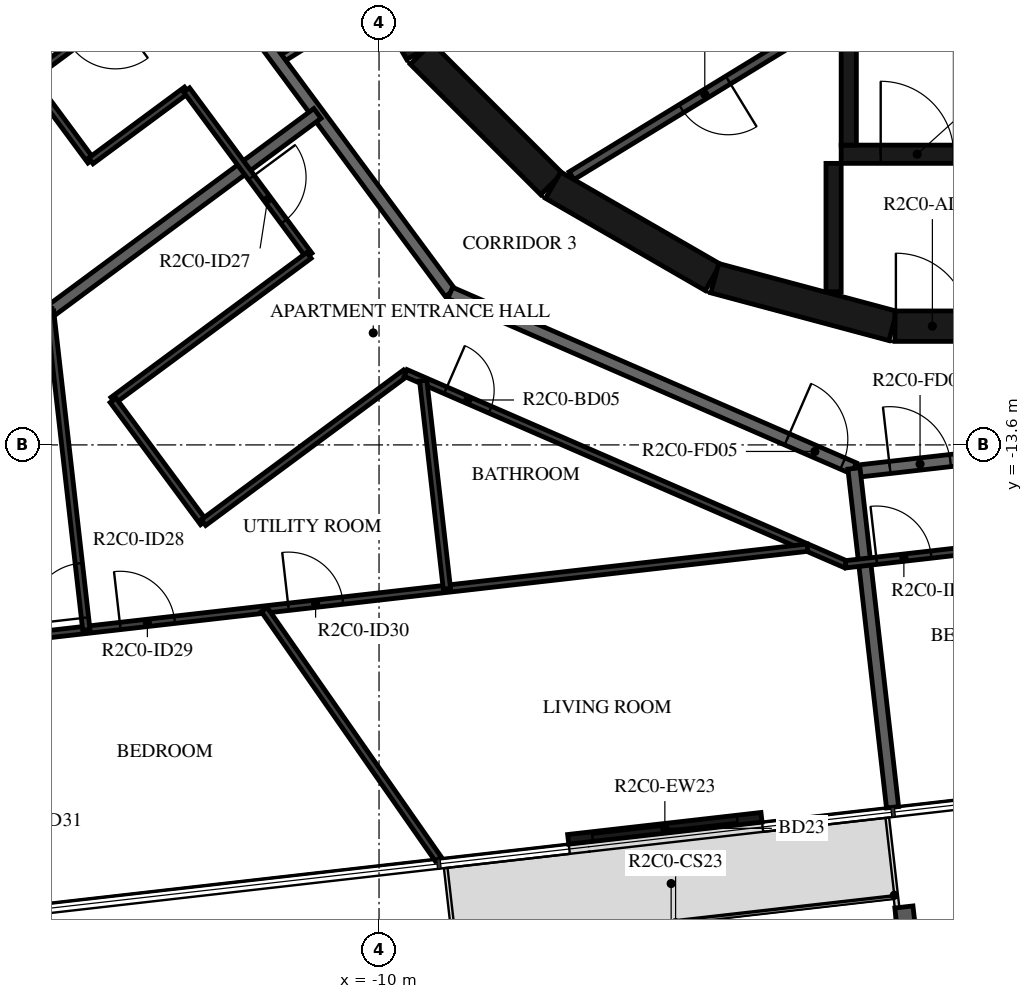
"""IFC4 building model, lengths in metres.
Left out: names, types, materials, properties, quantities, classifications, styles, units other than length and angle.
Written with IfcOpenShell. Run it as: python <this file> out.ifc"""

import sys

from ifc_helpers import new_model, si_unit, direction, frame, frame_2d, origin, origin_2d, place, context, subcontext, project, spatial, rectangle, i_section, extrude, element, fill, save


model = new_model("IFC4")
c1 = context("Model", 3, precision=1e-05, world=origin(), true_north=direction((0.0, 1.0)))
c2 = subcontext(c1, "Body", "Model", "MODEL_VIEW")
j1 = project(units=[si_unit("LENGTHUNIT", "METRE"), si_unit("PLANEANGLEUNIT", "RADIAN")], contexts=[c1])
p1 = place(None, origin())
s1 = spatial("IfcSite", under=j1, at=p1, CompositionType="ELEMENT")
p2 = place(p1, origin())
s2 = spatial("IfcBuilding", under=s1, at=p2, CompositionType="ELEMENT")
p3 = place(p2, frame((0.0, 0.0, 104.7)))
s3 = spatial("IfcBuildingStorey", under=s2, at=p3, CompositionType="ELEMENT", Elevation=104.7)
p4 = place(p3, frame((-1.317, -21.646, -0.38), z_axis=(0.0, 0.0, 1.0), x_axis=(-0.993571881569, -0.113202986513, 0.0)))
e1 = element("IfcColumn", 1, at=p4, inside=s3, PredefinedType="COLUMN", context=c2, shape_type="SweptSolid", body=[
    extrude(i_section(OverallWidth=0.3, OverallDepth=0.9, WebThickness=0.019, FlangeThickness=0.035, FilletRadius=0.03, at=origin_2d()), origin(), (0.0, 0.0, 1.0), 2.616),
])
p5 = place(p3, frame((-6.889, -20.086, 0.0), z_axis=(0.0, 0.0, 1.0), x_axis=(0.993578576686, 0.113144208648, 0.0)))
e2 = element("IfcWall", 2, at=p5, inside=s3, PredefinedType="STANDARD", context=c2, shape_type="SweptSolid", body=[
    extrude(rectangle(XDim=3.2, YDim=0.16, at=frame_2d((1.6, 0.0))), origin(), (0.0, 0.0, 1.0), 3.05),
])
p6 = place(p5, frame((0.4, 0.0, 0.0)))
e3 = element("IfcOpeningElement", 3, at=p6, cuts=e2, PredefinedType="OPENING", context=c2, shape_type="SweptSolid", body=[
    extrude(rectangle(XDim=2.4, YDim=2.4, at=frame_2d((1.2, 1.2))), frame((0.0, 0.09, 0.0), z_axis=(0.0, -1.0, 0.0), x_axis=(1.0, 0.0, 0.0)), (0.0, 0.0, 1.0), 0.18),
])
p7 = place(p3, frame((-10.845, -4.51, 0.0), z_axis=(0.0, 0.0, 1.0), x_axis=(0.500087131594, -0.865975092491, 0.0)))
e4 = element("IfcWall", 4, at=p7, inside=s3, PredefinedType="SHEAR", context=c2, shape_type="SweptSolid", body=[
    extrude(rectangle(XDim=3.033, YDim=0.5, at=frame_2d((1.516, 0.0))), origin(), (0.0, 0.0, 1.0), 3.05),
])
p8 = place(p3, frame((-9.308, -7.164, 0.0), z_axis=(0.0, 0.0, 1.0), x_axis=(0.707106781187, -0.707106781187, 0.0)))
e5 = element("IfcWall", 5, at=p8, inside=s3, PredefinedType="SHEAR", context=c2, shape_type="SweptSolid", body=[
    extrude(rectangle(XDim=3.032, YDim=0.5, at=frame_2d((1.516, 0.0))), origin(), (0.0, 0.0, 1.0), 3.05),
])
for number, where, z_axis, x_axis in (
    (6, (-7.137, -9.329, 0.0), (0.0, 0.0, 1.0), (0.866, -0.5, 0.0)),
    (7, (-4.479, -10.858, 0.0), (0.0, 0.0, 1.0), (0.966, -0.259, 0.0)),
):
    element("IfcWall", number, at=place(p3, frame(where, z_axis=z_axis, x_axis=x_axis)), inside=s3, PredefinedType="SHEAR", context=c2, shape_type="SweptSolid", body=[
        extrude(rectangle(XDim=3.033, YDim=0.5, at=frame_2d((1.516, 0.0))), origin(), (0.0, 0.0, 1.0), 3.05),
    ])
p9 = place(p3, frame((-1.516, -11.647, 0.0), z_axis=(0.0, 0.0, 1.0), x_axis=(1.0, 0.0, 0.0)))
e8 = element("IfcWall", 8, at=p9, inside=s3, PredefinedType="SHEAR", context=c2, shape_type="SweptSolid", body=[
    extrude(rectangle(XDim=3.033, YDim=0.5, at=frame_2d((1.516, 0.0))), origin(), (0.0, 0.0, 1.0), 3.05),
])
p10 = place(p9, frame((0.016, 0.0, 0.0)))
e9 = element("IfcOpeningElement", 9, at=p10, cuts=e8, PredefinedType="OPENING", context=c2, shape_type="SweptSolid", body=[
    extrude(rectangle(XDim=1.2, YDim=2.1, at=frame_2d((0.6, 1.05))), frame((0.0, 0.26, 0.0), z_axis=(0.0, -1.0, 0.0), x_axis=(1.0, 0.0, 0.0)), (0.0, 0.0, 1.0), 0.52),
])
p11 = place(p3, frame((-2.275, -8.67, 0.0), z_axis=(0.0, 0.0, 1.0), x_axis=(0.0, 1.0, 0.0)))
e10 = element("IfcWall", 10, at=p11, inside=s3, PredefinedType="SHEAR", context=c2, shape_type="SweptSolid", body=[
    extrude(rectangle(XDim=3.32, YDim=0.25, at=frame_2d((1.66, 0.0))), origin(), (0.0, 0.0, 1.0), 3.05),
])
p12 = place(p3, frame((-2.4, -8.82, 0.0), z_axis=(0.0, 0.0, 1.0), x_axis=(1.0, 0.0, 0.0)))
e11 = element("IfcWall", 11, at=p12, inside=s3, PredefinedType="SHEAR", context=c2, shape_type="SweptSolid", body=[
    extrude(rectangle(XDim=2.5, YDim=0.3, at=frame_2d((1.25, 0.0))), origin(), (0.0, 0.0, 1.0), 3.05),
])
p13 = place(p12, frame((0.65, 0.0, 0.0)))
e12 = element("IfcOpeningElement", 12, at=p13, cuts=e11, PredefinedType="OPENING", context=c2, shape_type="SweptSolid", body=[
    extrude(rectangle(XDim=1.2, YDim=2.1, at=frame_2d((0.6, 1.05))), frame((0.0, 0.16, 0.0), z_axis=(0.0, -1.0, 0.0), x_axis=(1.0, 0.0, 0.0)), (0.0, 0.0, 1.0), 0.32),
])
p14 = place(p3, frame((-2.525, -8.97, 0.0), z_axis=(0.0, 0.0, 1.0), x_axis=(0.0, -1.0, 0.0)))
e13 = element("IfcWall", 13, at=p14, inside=s3, PredefinedType="SHEAR", context=c2, shape_type="SweptSolid", body=[
    extrude(rectangle(XDim=2.11, YDim=0.25, at=frame_2d((1.055, 0.0))), origin(), (0.0, 0.0, 1.0), 3.05),
])
p15 = place(p3, frame((-2.451, -6.495, 0.0), z_axis=(0.0, 0.0, 1.0), x_axis=(-0.853250115418, -0.521501908471, 0.0)))
e14 = element("IfcWall", 14, at=p15, inside=s3, PredefinedType="PARTITIONING", context=c2, shape_type="SweptSolid", body=[
    extrude(rectangle(XDim=5.137, YDim=0.15, at=frame_2d((2.569, 0.0))), origin(), (0.0, 0.0, 1.0), 3.05),
])
p16 = place(p15, frame((2.119, 0.0, 0.0)))
e15 = element("IfcOpeningElement", 15, at=p16, cuts=e14, PredefinedType="OPENING", context=c2, shape_type="SweptSolid", body=[
    extrude(rectangle(XDim=0.9, YDim=2.1, at=frame_2d((0.45, 1.05))), frame((0.0, 0.085, 0.0), z_axis=(0.0, -1.0, 0.0), x_axis=(1.0, 0.0, 0.0)), (0.0, 0.0, 1.0), 0.17),
])
p17 = place(p3, frame((-11.654, -7.282, 0.0), z_axis=(0.0, 0.0, 1.0), x_axis=(0.848117698675, 0.529807860638, 0.0)))
e16 = element("IfcWall", 16, at=p17, inside=s3, PredefinedType="PARTITIONING", context=c2, shape_type="SweptSolid", body=[
    extrude(rectangle(XDim=1.838, YDim=0.12, at=frame_2d((0.919, 0.0))), origin(), (0.0, 0.0, 1.0), 3.05),
])
p18 = place(p17, frame((0.115, 0.0, 0.0)))
e17 = element("IfcOpeningElement", 17, at=p18, cuts=e16, PredefinedType="OPENING", context=c2, shape_type="SweptSolid", body=[
    extrude(rectangle(XDim=1.2, YDim=2.1, at=frame_2d((0.6, 1.05))), frame((0.0, 0.07, 0.0), z_axis=(0.0, -1.0, 0.0), x_axis=(1.0, 0.0, 0.0)), (0.0, 0.0, 1.0), 0.14),
])
p19 = place(p3, frame((-13.196, -5.198, 0.0), z_axis=(0.0, 0.0, 1.0), x_axis=(0.594805187394, -0.803869883159, 0.0)))
e18 = element("IfcWall", 18, at=p19, inside=s3, PredefinedType="STANDARD", context=c2, shape_type="SweptSolid", body=[
    extrude(rectangle(XDim=7.342, YDim=0.2, at=frame_2d((3.671, 0.0))), origin(), (0.0, 0.0, 1.0), 3.05),
])
p20 = place(p3, frame((-8.829, -11.1, 0.0), z_axis=(0.0, 0.0, 1.0), x_axis=(0.917063622491, -0.398740908742, 0.0)))
e19 = element("IfcWall", 19, at=p20, inside=s3, PredefinedType="STANDARD", context=c2, shape_type="SweptSolid", body=[
    extrude(rectangle(XDim=7.24, YDim=0.2, at=frame_2d((3.62, 0.0))), origin(), (0.0, 0.0, 1.0), 3.05),
])
p21 = place(p20, frame((6.04, 0.0, 0.0)))
e20 = element("IfcOpeningElement", 20, at=p21, cuts=e19, PredefinedType="OPENING", context=c2, shape_type="SweptSolid", body=[
    extrude(rectangle(XDim=1.0, YDim=2.1, at=frame_2d((0.5, 1.05))), frame((0.0, 0.11, 0.0), z_axis=(0.0, -1.0, 0.0), x_axis=(1.0, 0.0, 0.0)), (0.0, 0.0, 1.0), 0.22),
])
p22 = place(p3, frame((-2.096, -14.028, 0.0), z_axis=(0.0, 0.0, 1.0), x_axis=(0.993569170114, 0.113226782163, 0.0)))
e21 = element("IfcWall", 21, at=p22, inside=s3, PredefinedType="STANDARD", context=c2, shape_type="SweptSolid", body=[
    extrude(rectangle(XDim=7.342, YDim=0.2, at=frame_2d((3.671, 0.0))), origin(), (0.0, 0.0, 1.0), 3.05),
])
p23 = place(p22, frame((0.5, 0.0, 0.0)))
e22 = element("IfcOpeningElement", 22, at=p23, cuts=e21, PredefinedType="OPENING", context=c2, shape_type="SweptSolid", body=[
    extrude(rectangle(XDim=1.0, YDim=2.1, at=frame_2d((0.5, 1.05))), frame((0.0, 0.11, 0.0), z_axis=(0.0, -1.0, 0.0), x_axis=(1.0, 0.0, 0.0)), (0.0, 0.0, 1.0), 0.22),
])
p24 = place(p3, frame((-16.649, -12.32, 0.0), z_axis=(0.0, 0.0, 1.0), x_axis=(0.803869204071, 0.594806105169, 0.0)))
e23 = element("IfcWall", 23, at=p24, inside=s3, PredefinedType="STANDARD", context=c2, shape_type="SweptSolid", body=[
    extrude(rectangle(XDim=7.011, YDim=0.2, at=frame_2d((3.506, 0.0))), origin(), (0.0, 0.0, 1.0), 3.05),
])
p25 = place(p3, frame((-1.555, -19.559, 0.0), z_axis=(0.0, 0.0, 1.0), x_axis=(-0.113221250863, 0.993569800443, 0.0)))
e24 = element("IfcWall", 24, at=p25, inside=s3, PredefinedType="STANDARD", context=c2, shape_type="SweptSolid", body=[
    extrude(rectangle(XDim=5.609, YDim=0.2, at=frame_2d((2.804, 0.0))), origin(), (0.0, 0.0, 1.0), 3.05),
])
p26 = place(p3, frame((-14.175, -6.397, 0.0), z_axis=(0.0, 0.0, 1.0), x_axis=(-0.803901491033, -0.594762467474, 0.0)))
e25 = element("IfcWall", 25, at=p26, inside=s3, PredefinedType="PARTITIONING", context=c2, shape_type="SweptSolid", body=[
    extrude(rectangle(XDim=1.959, YDim=0.12, at=frame_2d((0.979, 0.0))), origin(), (0.0, 0.0, 1.0), 3.05),
])
p27 = place(p26, frame((0.2, 0.0, 0.0)))
e26 = element("IfcOpeningElement", 26, at=p27, cuts=e25, PredefinedType="OPENING", context=c2, shape_type="SweptSolid", body=[
    extrude(rectangle(XDim=0.9, YDim=2.1, at=frame_2d((0.45, 1.05))), frame((0.0, 0.07, 0.0), z_axis=(0.0, -1.0, 0.0), x_axis=(1.0, 0.0, 0.0)), (0.0, 0.0, 1.0), 0.14),
])
p28 = place(p3, frame((-15.75, -7.562, 0.0), z_axis=(0.0, 0.0, 1.0), x_axis=(0.594863421241, -0.803826791087, 0.0)))
e27 = element("IfcWall", 27, at=p28, inside=s3, PredefinedType="PARTITIONING", context=c2, shape_type="SweptSolid", body=[
    extrude(rectangle(XDim=1.7, YDim=0.12, at=frame_2d((0.85, 0.0))), origin(), (0.0, 0.0, 1.0), 3.05),
])
p29 = place(p3, frame((-14.739, -8.929, 0.0), z_axis=(0.0, 0.0, 1.0), x_axis=(0.803901491033, 0.594762467474, 0.0)))
e28 = element("IfcWall", 28, at=p29, inside=s3, PredefinedType="PARTITIONING", context=c2, shape_type="SweptSolid", body=[
    extrude(rectangle(XDim=1.959, YDim=0.12, at=frame_2d((0.979, 0.0))), origin(), (0.0, 0.0, 1.0), 3.05),
])
p30 = place(p3, frame((-13.164, -7.764, 0.0), z_axis=(0.0, 0.0, 1.0), x_axis=(0.594837409261, -0.803846040324, 0.0)))
e29 = element("IfcWall", 29, at=p30, inside=s3, PredefinedType="PARTITIONING", context=c2, shape_type="SweptSolid", body=[
    extrude(rectangle(XDim=3.383, YDim=0.12, at=frame_2d((1.691, 0.0))), origin(), (0.0, 0.0, 1.0), 3.05),
])
p31 = place(p30, frame((1.789, 0.0, 0.0)))
e30 = element("IfcOpeningElement", 30, at=p31, cuts=e29, PredefinedType="OPENING", context=c2, shape_type="SweptSolid", body=[
    extrude(rectangle(XDim=0.9, YDim=2.1, at=frame_2d((0.45, 1.05))), frame((0.0, 0.07, 0.0), z_axis=(0.0, -1.0, 0.0), x_axis=(1.0, 0.0, 0.0)), (0.0, 0.0, 1.0), 0.14),
])
p32 = place(p3, frame((-11.152, -10.483, 0.0), z_axis=(0.0, 0.0, 1.0), x_axis=(-0.803843064298, -0.594841430954, 0.0)))
e31 = element("IfcWall", 31, at=p32, inside=s3, PredefinedType="PARTITIONING", context=c2, shape_type="SweptSolid", body=[
    extrude(rectangle(XDim=4.008, YDim=0.12, at=frame_2d((2.004, 0.0))), origin(), (0.0, 0.0, 1.0), 3.05),
])
p33 = place(p3, frame((-14.374, -12.867, 0.0), z_axis=(0.0, 0.0, 1.0), x_axis=(0.594800097121, -0.803873649565, 0.0)))
e32 = element("IfcWall", 32, at=p33, inside=s3, PredefinedType="PARTITIONING", context=c2, shape_type="SweptSolid", body=[
    extrude(rectangle(XDim=2.5, YDim=0.12, at=frame_2d((1.25, 0.0))), origin(), (0.0, 0.0, 1.0), 3.05),
])
p34 = place(p3, frame((-12.886, -14.877, 0.0), z_axis=(0.0, 0.0, 1.0), x_axis=(0.803816491389, 0.594877338761, 0.0)))
e33 = element("IfcWall", 33, at=p34, inside=s3, PredefinedType="PARTITIONING", context=c2, shape_type="SweptSolid", body=[
    extrude(rectangle(XDim=4.135, YDim=0.12, at=frame_2d((2.068, 0.0))), origin(), (0.0, 0.0, 1.0), 3.05),
])
p35 = place(p3, frame((-9.562, -12.417, 0.0), z_axis=(0.0, 0.0, 1.0), x_axis=(0.917063169851, -0.398741949767, 0.0)))
e34 = element("IfcWall", 34, at=p35, inside=s3, PredefinedType="PARTITIONING", context=c2, shape_type="SweptSolid", body=[
    extrude(rectangle(XDim=7.891, YDim=0.12, at=frame_2d((3.946, 0.0))), origin(), (0.0, 0.0, 1.0), 3.05),
])
p36 = place(p35, frame((0.715, 0.0, 0.0)))
e35 = element("IfcOpeningElement", 35, at=p36, cuts=e34, PredefinedType="OPENING", context=c2, shape_type="SweptSolid", body=[
    extrude(rectangle(XDim=0.8, YDim=2.1, at=frame_2d((0.4, 1.05))), frame((0.0, 0.07, 0.0), z_axis=(0.0, -1.0, 0.0), x_axis=(1.0, 0.0, 0.0)), (0.0, 0.0, 1.0), 0.14),
])
p37 = place(p3, frame((-2.326, -15.563, 0.0), z_axis=(0.0, 0.0, 1.0), x_axis=(0.993575068384, 0.113175012641, 0.0)))
e36 = element("IfcWall", 36, at=p37, inside=s3, PredefinedType="PARTITIONING", context=c2, shape_type="SweptSolid", body=[
    extrude(rectangle(XDim=3.799, YDim=0.12, at=frame_2d((1.899, 0.0))), origin(), (0.0, 0.0, 1.0), 3.05),
])
p38 = place(p37, frame((0.513, 0.0, 0.0)))
e37 = element("IfcOpeningElement", 37, at=p38, cuts=e36, PredefinedType="OPENING", context=c2, shape_type="SweptSolid", body=[
    extrude(rectangle(XDim=0.9, YDim=2.1, at=frame_2d((0.45, 1.05))), frame((0.0, 0.07, 0.0), z_axis=(0.0, -1.0, 0.0), x_axis=(1.0, 0.0, 0.0)), (0.0, 0.0, 1.0), 0.14),
])
p39 = place(p3, frame((-17.437, -16.94, 0.0), z_axis=(0.0, 0.0, 1.0), x_axis=(0.993573314119, 0.113190412448, 0.0)))
e38 = element("IfcWall", 38, at=p39, inside=s3, PredefinedType="PARTITIONING", context=c2, shape_type="SweptSolid", body=[
    extrude(rectangle(XDim=14.576, YDim=0.12, at=frame_2d((7.288, 0.0))), origin(), (0.0, 0.0, 1.0), 3.05),
])
p40 = place(p39, frame((3.201, 0.0, 0.0)))
e39 = element("IfcOpeningElement", 39, at=p40, cuts=e38, PredefinedType="OPENING", context=c2, shape_type="SweptSolid", body=[
    extrude(rectangle(XDim=0.9, YDim=2.1, at=frame_2d((0.45, 1.05))), frame((0.0, 0.07, 0.0), z_axis=(0.0, -1.0, 0.0), x_axis=(1.0, 0.0, 0.0)), (0.0, 0.0, 1.0), 0.14),
])
p41 = place(p39, frame((5.985, 0.0, 0.0)))
e40 = element("IfcOpeningElement", 40, at=p41, cuts=e38, PredefinedType="OPENING", context=c2, shape_type="SweptSolid", body=[
    extrude(rectangle(XDim=0.9, YDim=2.1, at=frame_2d((0.45, 1.05))), frame((0.0, 0.07, 0.0), z_axis=(0.0, -1.0, 0.0), x_axis=(1.0, 0.0, 0.0)), (0.0, 0.0, 1.0), 0.14),
])
p42 = place(p3, frame((-14.813, -16.641, 0.0), z_axis=(0.0, 0.0, 1.0), x_axis=(-0.113210971478, 0.993570971767, 0.0)))
e41 = element("IfcWall", 41, at=p42, inside=s3, PredefinedType="PARTITIONING", context=c2, shape_type="SweptSolid", body=[
    extrude(rectangle(XDim=5.273, YDim=0.12, at=frame_2d((2.636, 0.0))), origin(), (0.0, 0.0, 1.0), 3.05),
])
p43 = place(p42, frame((0.2, 0.0, 0.0)))
e42 = element("IfcOpeningElement", 42, at=p43, cuts=e41, PredefinedType="OPENING", context=c2, shape_type="SweptSolid", body=[
    extrude(rectangle(XDim=0.9, YDim=2.1, at=frame_2d((0.45, 1.05))), frame((0.0, 0.07, 0.0), z_axis=(0.0, -1.0, 0.0), x_axis=(1.0, 0.0, 0.0)), (0.0, 0.0, 1.0), 0.14),
])
p44 = place(p3, frame((-8.884, -15.966, 0.0), z_axis=(0.0, 0.0, 1.0), x_axis=(-0.113230836929, 0.993568708026, 0.0)))
e43 = element("IfcWall", 43, at=p44, inside=s3, PredefinedType="PARTITIONING", context=c2, shape_type="SweptSolid", body=[
    extrude(rectangle(XDim=3.446, YDim=0.12, at=frame_2d((1.723, 0.0))), origin(), (0.0, 0.0, 1.0), 3.05),
])
p45 = place(p3, frame((-9.026, -20.41, 0.0), z_axis=(0.0, 0.0, 1.0), x_axis=(-0.57218083256, 0.82012748695, 0.0)))
e44 = element("IfcWall", 44, at=p45, inside=s3, PredefinedType="PARTITIONING", context=c2, shape_type="SweptSolid", body=[
    extrude(rectangle(XDim=5.002, YDim=0.12, at=frame_2d((2.501, 0.0))), origin(), (0.0, 0.0, 1.0), 3.05),
])
p46 = place(p6, origin())
e45 = element("IfcDoor", 45, at=p46, inside=s3, OperationType="DOUBLE_DOOR_SLIDING", PredefinedType="DOOR", context=c2, shape_type="SweptSolid", body=[
    extrude(rectangle(XDim=2.4, YDim=2.4, at=frame_2d((1.2, 1.2))), frame((0.0, 0.025, 0.0), z_axis=(0.0, -1.0, 0.0), x_axis=(1.0, 0.0, 0.0)), (0.0, 0.0, 1.0), 0.05),
])
fill(e3, e45)
p47 = place(p13, origin())
e46 = element("IfcDoor", 46, at=p47, inside=s3, OperationType="SINGLE_SWING_LEFT", PredefinedType="DOOR", context=c2, shape_type="SweptSolid", body=[
    extrude(rectangle(XDim=1.2, YDim=2.1, at=frame_2d((0.6, 1.05))), frame((0.0, 0.025, 0.0), z_axis=(0.0, -1.0, 0.0), x_axis=(1.0, 0.0, 0.0)), (0.0, 0.0, 1.0), 0.05),
])
fill(e12, e46)
p48 = place(p10, origin())
e47 = element("IfcDoor", 47, at=p48, inside=s3, OperationType="SINGLE_SWING_RIGHT", PredefinedType="DOOR", context=c2, shape_type="SweptSolid", body=[
    extrude(rectangle(XDim=1.2, YDim=2.1, at=frame_2d((0.6, 1.05))), frame((0.0, 0.025, 0.0), z_axis=(0.0, -1.0, 0.0), x_axis=(1.0, 0.0, 0.0)), (0.0, 0.0, 1.0), 0.05),
])
fill(e9, e47)
p49 = place(p16, origin())
e48 = element("IfcDoor", 48, at=p49, inside=s3, OperationType="SINGLE_SWING_RIGHT", PredefinedType="DOOR", context=c2, shape_type="SweptSolid", body=[
    extrude(rectangle(XDim=0.9, YDim=2.1, at=frame_2d((0.45, 1.05))), frame((0.0, 0.025, 0.0), z_axis=(0.0, -1.0, 0.0), x_axis=(1.0, 0.0, 0.0)), (0.0, 0.0, 1.0), 0.05),
])
fill(e15, e48)
p50 = place(p21, origin())
e49 = element("IfcDoor", 49, at=p50, inside=s3, OperationType="SINGLE_SWING_LEFT", PredefinedType="DOOR", context=c2, shape_type="SweptSolid", body=[
    extrude(rectangle(XDim=1.0, YDim=2.1, at=frame_2d((0.5, 1.05))), frame((0.0, 0.025, 0.0), z_axis=(0.0, -1.0, 0.0), x_axis=(1.0, 0.0, 0.0)), (0.0, 0.0, 1.0), 0.05),
])
fill(e20, e49)
p51 = place(p31, origin())
e50 = element("IfcDoor", 50, at=p51, inside=s3, OperationType="SINGLE_SWING_LEFT", PredefinedType="DOOR", context=c2, shape_type="SweptSolid", body=[
    extrude(rectangle(XDim=0.9, YDim=2.1, at=frame_2d((0.45, 1.05))), frame((0.0, 0.025, 0.0), z_axis=(0.0, -1.0, 0.0), x_axis=(1.0, 0.0, 0.0)), (0.0, 0.0, 1.0), 0.05),
])
fill(e30, e50)
p52 = place(p36, origin())
e51 = element("IfcDoor", 51, at=p52, inside=s3, OperationType="SINGLE_SWING_LEFT", PredefinedType="DOOR", context=c2, shape_type="SweptSolid", body=[
    extrude(rectangle(XDim=0.8, YDim=2.1, at=frame_2d((0.4, 1.05))), frame((0.0, 0.025, 0.0), z_axis=(0.0, -1.0, 0.0), x_axis=(1.0, 0.0, 0.0)), (0.0, 0.0, 1.0), 0.05),
])
fill(e35, e51)
p53 = place(p43, origin())
e52 = element("IfcDoor", 52, at=p53, inside=s3, OperationType="SINGLE_SWING_LEFT", PredefinedType="DOOR", context=c2, shape_type="SweptSolid", body=[
    extrude(rectangle(XDim=0.9, YDim=2.1, at=frame_2d((0.45, 1.05))), frame((0.0, 0.025, 0.0), z_axis=(0.0, -1.0, 0.0), x_axis=(1.0, 0.0, 0.0)), (0.0, 0.0, 1.0), 0.05),
])
fill(e42, e52)
p54 = place(p40, origin())
e53 = element("IfcDoor", 53, at=p54, inside=s3, OperationType="SINGLE_SWING_LEFT", PredefinedType="DOOR", context=c2, shape_type="SweptSolid", body=[
    extrude(rectangle(XDim=0.9, YDim=2.1, at=frame_2d((0.45, 1.05))), frame((0.0, 0.025, 0.0), z_axis=(0.0, -1.0, 0.0), x_axis=(1.0, 0.0, 0.0)), (0.0, 0.0, 1.0), 0.05),
])
fill(e39, e53)
p55 = place(p41, origin())
e54 = element("IfcDoor", 54, at=p55, inside=s3, OperationType="SINGLE_SWING_LEFT", PredefinedType="DOOR", context=c2, shape_type="SweptSolid", body=[
    extrude(rectangle(XDim=0.9, YDim=2.1, at=frame_2d((0.45, 1.05))), frame((0.0, 0.025, 0.0), z_axis=(0.0, -1.0, 0.0), x_axis=(1.0, 0.0, 0.0)), (0.0, 0.0, 1.0), 0.05),
])
fill(e40, e54)
p56 = place(p23, origin())
e55 = element("IfcDoor", 55, at=p56, inside=s3, OperationType="SINGLE_SWING_LEFT", PredefinedType="DOOR", context=c2, shape_type="SweptSolid", body=[
    extrude(rectangle(XDim=1.0, YDim=2.1, at=frame_2d((0.5, 1.05))), frame((0.0, 0.025, 0.0), z_axis=(0.0, -1.0, 0.0), x_axis=(1.0, 0.0, 0.0)), (0.0, 0.0, 1.0), 0.05),
])
fill(e22, e55)
p57 = place(p38, origin())
e56 = element("IfcDoor", 56, at=p57, inside=s3, OperationType="SINGLE_SWING_LEFT", PredefinedType="DOOR", context=c2, shape_type="SweptSolid", body=[
    extrude(rectangle(XDim=0.9, YDim=2.1, at=frame_2d((0.45, 1.05))), frame((0.0, 0.025, 0.0), z_axis=(0.0, -1.0, 0.0), x_axis=(1.0, 0.0, 0.0)), (0.0, 0.0, 1.0), 0.05),
])
fill(e37, e56)
p58 = place(p18, origin())
e57 = element("IfcDoor", 57, at=p58, inside=s3, OperationType="DOUBLE_DOOR_SINGLE_SWING", PredefinedType="DOOR", context=c2, shape_type="SweptSolid", body=[
    extrude(rectangle(XDim=1.2, YDim=2.1, at=frame_2d((0.6, 1.05))), frame((0.0, 0.025, 0.0), z_axis=(0.0, -1.0, 0.0), x_axis=(1.0, 0.0, 0.0)), (0.0, 0.0, 1.0), 0.05),
])
fill(e17, e57)
save(model, sys.argv[1])
